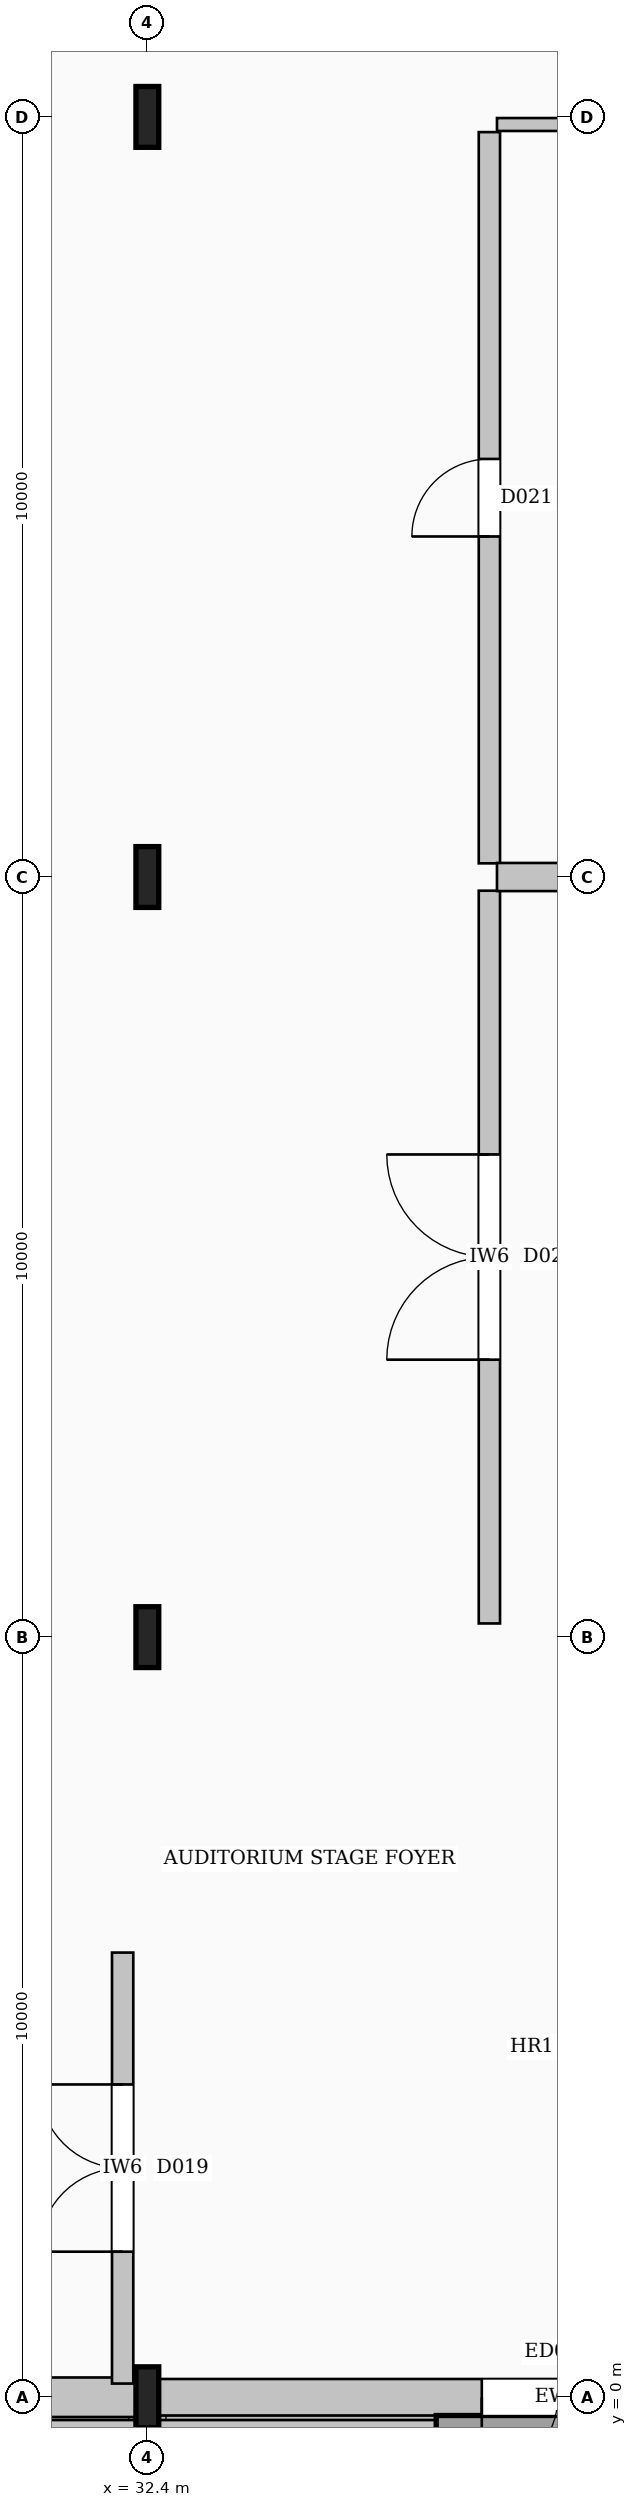
"""IFC4 building model, lengths in metres.
Left out: names, types, materials, properties, quantities, classifications, styles, units other than length and angle.
Written with IfcOpenShell. Run it as: python <this file> out.ifc"""

import sys

from ifc_helpers import new_model, si_unit, direction, frame, frame_2d, origin, origin_2d, place, context, subcontext, project, spatial, rectangle, i_section, extrude, element, fill, save


model = new_model("IFC4")
c1 = context("Model", 3, precision=1e-05, world=origin(), true_north=direction((0.0, 1.0)))
c2 = subcontext(c1, "Body", "Model", "MODEL_VIEW")
j1 = project(units=[si_unit("LENGTHUNIT", "METRE"), si_unit("PLANEANGLEUNIT", "RADIAN")], contexts=[c1])
p1 = place(None, origin())
s1 = spatial("IfcSite", under=j1, at=p1, CompositionType="ELEMENT")
p2 = place(p1, origin())
s2 = spatial("IfcBuilding", under=s1, at=p2, CompositionType="ELEMENT")
p3 = place(p2, origin())
s3 = spatial("IfcBuildingStorey", under=s2, at=p3, CompositionType="ELEMENT", Elevation=0.0)
for number, where, z_axis, x_axis in (
    (1, (32.4, 0.0, 0.0), (0.0, 0.0, 1.0), (1.0, 0.0, 0.0)),
    (2, (32.4, 10.0, 0.0), (0.0, 0.0, 1.0), (1.0, 0.0, 0.0)),
    (3, (32.4, 20.0, 0.0), (0.0, 0.0, 1.0), (1.0, 0.0, 0.0)),
    (4, (32.4, 30.0, 0.0), (0.0, 0.0, 1.0), (1.0, 0.0, 0.0)),
):
    element("IfcColumn", number, at=place(p3, frame(where, z_axis=z_axis, x_axis=x_axis)), inside=s3, PredefinedType="COLUMN", context=c2, shape_type="SweptSolid", body=[
        extrude(i_section(OverallWidth=0.3, OverallDepth=0.8, WebThickness=0.018, FlangeThickness=0.033, FilletRadius=0.03, at=origin_2d()), origin(), (0.0, 0.0, 1.0), 4.8),
    ])
p4 = place(p3, frame((0.2, -0.43, -1.38), z_axis=(0.0, 0.0, 1.0), x_axis=(1.0, 0.0, 0.0)))
e5 = element("IfcWall", 5, at=p4, inside=s3, PredefinedType="PARAPET", context=c2, shape_type="SweptSolid", body=[
    extrude(rectangle(XDim=53.6, YDim=0.26, at=frame_2d((26.8, 0.0))), origin(), (0.0, 0.0, 1.0), 1.36),
])
p5 = place(p3, frame((21.745, 0.0, 0.0), z_axis=(0.0, 0.0, 1.0), x_axis=(1.0, 0.0, 0.0)))
e6 = element("IfcWall", 6, at=p5, inside=s3, PredefinedType="SOLIDWALL", context=c2, shape_type="SweptSolid", body=[
    extrude(rectangle(XDim=10.51, YDim=0.52, at=frame_2d((5.255, 0.0))), origin(), (0.0, 0.0, 1.0), 4.069),
])
p6 = place(p3, frame((32.545, 0.0, 0.0), z_axis=(0.0, 0.0, 1.0), x_axis=(1.0, 0.0, 0.0)))
e7 = element("IfcWall", 7, at=p6, inside=s3, PredefinedType="STANDARD", context=c2, shape_type="SweptSolid", body=[
    extrude(rectangle(XDim=10.51, YDim=0.48, at=frame_2d((5.255, 0.0))), origin(), (0.0, 0.0, 1.0), 4.069),
])
p7 = place(p6, frame((4.255, 0.0, 0.0)))
e8 = element("IfcOpeningElement", 8, at=p7, cuts=e7, PredefinedType="OPENING", context=c2, shape_type="SweptSolid", body=[
    extrude(rectangle(XDim=2.0, YDim=2.3, at=frame_2d((1.0, 1.15))), frame((0.0, 0.25, 0.0), z_axis=(0.0, -1.0, 0.0), x_axis=(1.0, 0.0, 0.0)), (0.0, 0.0, 1.0), 0.5),
])
p8 = place(p3, frame((32.075, 0.18, 0.0), z_axis=(0.0, 0.0, 1.0), x_axis=(0.0, 1.0, 0.0)))
e9 = element("IfcWall", 9, at=p8, inside=s3, PredefinedType="SOLIDWALL", context=c2, shape_type="SweptSolid", body=[
    extrude(rectangle(XDim=5.67, YDim=0.28, at=frame_2d((2.835, 0.0))), origin(), (0.0, 0.0, 1.0), 4.52),
])
p9 = place(p8, frame((1.735, 0.0, 0.0)))
e10 = element("IfcOpeningElement", 10, at=p9, cuts=e9, PredefinedType="OPENING", context=c2, shape_type="SweptSolid", body=[
    extrude(rectangle(XDim=2.2, YDim=2.5, at=frame_2d((1.1, 1.25))), frame((0.0, 0.15, 0.0), z_axis=(0.0, -1.0, 0.0), x_axis=(1.0, 0.0, 0.0)), (0.0, 0.0, 1.0), 0.3),
])
p10 = place(p3, frame((36.9, 10.18, 0.0), z_axis=(0.0, 0.0, 1.0), x_axis=(0.0, 1.0, 0.0)))
e11 = element("IfcWall", 11, at=p10, inside=s3, PredefinedType="SOLIDWALL", context=c2, shape_type="SweptSolid", body=[
    extrude(rectangle(XDim=9.64, YDim=0.28, at=frame_2d((4.82, 0.0))), origin(), (0.0, 0.0, 1.0), 4.52),
])
p11 = place(p10, frame((3.47, 0.0, 0.0)))
e12 = element("IfcOpeningElement", 12, at=p11, cuts=e11, PredefinedType="OPENING", context=c2, shape_type="SweptSolid", body=[
    extrude(rectangle(XDim=2.7, YDim=2.85, at=frame_2d((1.35, 1.425))), frame((0.0, 0.15, 0.0), z_axis=(0.0, -1.0, 0.0), x_axis=(1.0, 0.0, 0.0)), (0.0, 0.0, 1.0), 0.3),
])
p12 = place(p3, frame((36.9, 20.18, 0.0), z_axis=(0.0, 0.0, 1.0), x_axis=(0.0, 1.0, 0.0)))
e13 = element("IfcWall", 13, at=p12, inside=s3, PredefinedType="SOLIDWALL", context=c2, shape_type="SweptSolid", body=[
    extrude(rectangle(XDim=9.62, YDim=0.28, at=frame_2d((4.81, 0.0))), origin(), (0.0, 0.0, 1.0), 4.52),
])
p13 = place(p12, frame((4.3, 0.0, 0.0)))
e14 = element("IfcOpeningElement", 14, at=p13, cuts=e13, PredefinedType="OPENING", context=c2, shape_type="SweptSolid", body=[
    extrude(rectangle(XDim=1.02, YDim=2.18, at=frame_2d((0.51, 1.09))), frame((0.0, 0.15, 0.0), z_axis=(0.0, -1.0, 0.0), x_axis=(1.0, 0.0, 0.0)), (0.0, 0.0, 1.0), 0.3),
])
p14 = place(p3, frame((37.0, 20.0, 0.0), z_axis=(0.0, 0.0, 1.0), x_axis=(1.0, 0.0, 0.0)))
e15 = element("IfcWall", 15, at=p14, inside=s3, PredefinedType="PARTITIONING", context=c2, shape_type="SweptSolid", body=[
    extrude(rectangle(XDim=6.02, YDim=0.37, at=frame_2d((3.01, 0.0))), origin(), (0.0, 0.0, 1.0), 4.069),
])
p15 = place(p3, frame((37.0, 29.9, 0.0), z_axis=(0.0, 0.0, 1.0), x_axis=(1.0, 0.0, 0.0)))
e16 = element("IfcWall", 16, at=p15, inside=s3, PredefinedType="PARTITIONING", context=c2, shape_type="SweptSolid", body=[
    extrude(rectangle(XDim=6.0, YDim=0.17, at=frame_2d((3.0, 0.0))), origin(), (0.0, 0.0, 1.0), 4.069),
])
p16 = place(p7, frame((2.0, 0.0, 0.0), z_axis=(0.0, 0.0, 1.0), x_axis=(-1.0, 0.0, 0.0)))
e17 = element("IfcDoor", 17, at=p16, inside=s3, OperationType="DOUBLE_DOOR_SINGLE_SWING", PredefinedType="DOOR", context=c2, shape_type="SweptSolid", body=[
    extrude(rectangle(XDim=2.0, YDim=2.3, at=frame_2d((1.0, 1.15))), frame((0.0, 0.025, 0.0), z_axis=(0.0, -1.0, 0.0), x_axis=(1.0, 0.0, 0.0)), (0.0, 0.0, 1.0), 0.05),
])
fill(e8, e17)
p17 = place(p9, origin())
e18 = element("IfcDoor", 18, at=p17, inside=s3, OperationType="DOUBLE_DOOR_SINGLE_SWING", PredefinedType="DOOR", context=c2, shape_type="SweptSolid", body=[
    extrude(rectangle(XDim=2.2, YDim=2.5, at=frame_2d((1.1, 1.25))), frame((0.0, 0.025, 0.0), z_axis=(0.0, -1.0, 0.0), x_axis=(1.0, 0.0, 0.0)), (0.0, 0.0, 1.0), 0.05),
])
fill(e10, e18)
p18 = place(p11, origin())
e19 = element("IfcDoor", 19, at=p18, inside=s3, OperationType="DOUBLE_DOOR_SINGLE_SWING", PredefinedType="DOOR", context=c2, shape_type="SweptSolid", body=[
    extrude(rectangle(XDim=2.7, YDim=2.85, at=frame_2d((1.35, 1.425))), frame((0.0, 0.025, 0.0), z_axis=(0.0, -1.0, 0.0), x_axis=(1.0, 0.0, 0.0)), (0.0, 0.0, 1.0), 0.05),
])
fill(e12, e19)
p19 = place(p13, origin())
e20 = element("IfcDoor", 20, at=p19, inside=s3, OperationType="SINGLE_SWING_LEFT", PredefinedType="DOOR", context=c2, shape_type="SweptSolid", body=[
    extrude(rectangle(XDim=1.02, YDim=2.18, at=frame_2d((0.51, 1.09))), frame((0.0, 0.025, 0.0), z_axis=(0.0, -1.0, 0.0), x_axis=(1.0, 0.0, 0.0)), (0.0, 0.0, 1.0), 0.05),
])
fill(e14, e20)
save(model, sys.argv[1])
